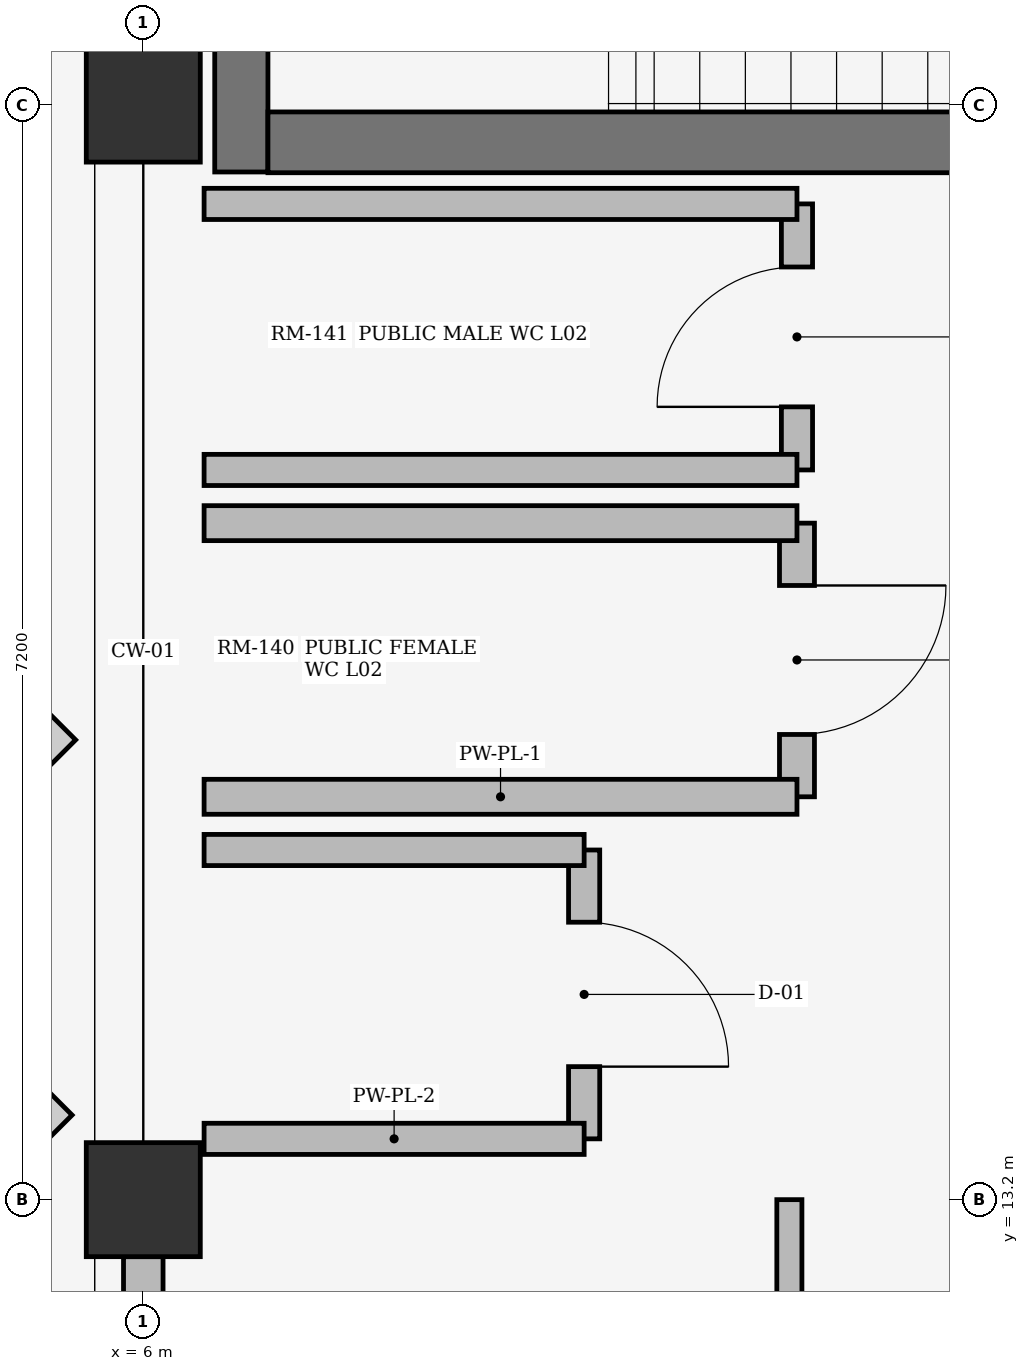
"""IFC4 building model, lengths in metres.
Left out: names, types, materials, properties, quantities, classifications, styles, units other than length and angle.
Written with IfcOpenShell. Run it as: python <this file> out.ifc"""

import sys

from ifc_helpers import new_model, si_unit, direction, frame, frame_2d, origin, origin_2d, place, context, subcontext, project, spatial, rectangle, extrude, element, fill, save


model = new_model("IFC4")
c1 = context("Model", 3, precision=1e-05, world=origin(), true_north=direction((0.0, 1.0)))
c2 = subcontext(c1, "Body", "Model", "MODEL_VIEW")
j1 = project(units=[si_unit("LENGTHUNIT", "METRE"), si_unit("PLANEANGLEUNIT", "RADIAN")], contexts=[c1])
p1 = place(None, origin())
s1 = spatial("IfcSite", under=j1, at=p1, CompositionType="ELEMENT")
p2 = place(p1, origin())
s2 = spatial("IfcBuilding", under=s1, at=p2, CompositionType="ELEMENT")
p3 = place(p2, frame((0.0, 0.0, 9.0)))
s3 = spatial("IfcBuildingStorey", under=s2, at=p3, CompositionType="ELEMENT", Elevation=9.0)
for number, where, z_axis, x_axis in (
    (1, (6.0, 13.2, 0.0), (0.0, 0.0, 1.0), (1.0, 0.0, 0.0)),
    (2, (6.0, 20.4, 0.0), (0.0, 0.0, 1.0), (1.0, 0.0, 0.0)),
):
    element("IfcColumn", number, at=place(p3, frame(where, z_axis=z_axis, x_axis=x_axis)), inside=s3, PredefinedType="COLUMN", context=c2, shape_type="SweptSolid", body=[
        extrude(rectangle(XDim=0.75, YDim=0.75, at=origin_2d()), origin(), (0.0, 0.0, 1.0), 3.96),
    ])
p4 = place(p3, frame((6.0, 6.375, 0.0), z_axis=(0.0, 0.0, 1.0), x_axis=(0.0, 1.0, 0.0)))
e3 = element("IfcWall", 3, at=p4, inside=s3, PredefinedType="STANDARD", context=c2, shape_type="SweptSolid", body=[
    extrude(rectangle(XDim=6.45, YDim=0.26, at=frame_2d((3.225, 0.0))), origin(), (0.0, 0.0, 1.0), 3.34),
])
p5 = place(p4, frame((2.675, 0.0, 0.75)))
e4 = element("IfcOpeningElement", 4, at=p5, cuts=e3, PredefinedType="OPENING", context=c2, shape_type="SweptSolid", body=[
    extrude(rectangle(XDim=1.1, YDim=1.25, at=frame_2d((0.55, 0.625))), frame((0.0, 0.14, 0.0), z_axis=(0.0, -1.0, 0.0), x_axis=(1.0, 0.0, 0.0)), (0.0, 0.0, 1.0), 0.28),
])
p6 = place(p3, frame((6.645, 24.55, 0.0), z_axis=(0.0, 0.0, 1.0), x_axis=(0.0, -1.0, 0.0)))
e5 = element("IfcWall", 5, at=p6, inside=s3, PredefinedType="SHEAR", context=c2, shape_type="SweptSolid", body=[
    extrude(rectangle(XDim=4.59, YDim=0.35, at=frame_2d((2.295, 0.0))), origin(), (0.0, 0.0, 1.0), 3.96),
])
p7 = place(p3, frame((14.8, 20.155, 0.0), z_axis=(0.0, 0.0, 1.0), x_axis=(-1.0, 0.0, 0.0)))
e6 = element("IfcWall", 6, at=p7, inside=s3, PredefinedType="SHEAR", context=c2, shape_type="SweptSolid", body=[
    extrude(rectangle(XDim=7.98, YDim=0.4, at=frame_2d((3.99, 0.0))), origin(), (0.0, 0.0, 1.0), 3.96),
])
p8 = place(p3, frame((8.9, 13.6, 0.0), z_axis=(0.0, 0.0, 1.0), x_axis=(0.0, 1.0, 0.0)))
e7 = element("IfcWall", 7, at=p8, inside=s3, PredefinedType="PLUMBINGWALL", context=c2, shape_type="SweptSolid", body=[
    extrude(rectangle(XDim=1.9, YDim=0.205, at=frame_2d((0.95, 0.0))), origin(), (0.0, 0.0, 1.0), 3.94),
])
p9 = place(p8, frame((0.475, 0.0, 0.0)))
e8 = element("IfcOpeningElement", 8, at=p9, cuts=e7, PredefinedType="OPENING", context=c2, shape_type="SweptSolid", body=[
    extrude(rectangle(XDim=0.95, YDim=2.15, at=frame_2d((0.475, 1.075))), frame((0.0, 0.113, 0.0), z_axis=(0.0, -1.0, 0.0), x_axis=(1.0, 0.0, 0.0)), (0.0, 0.0, 1.0), 0.225),
])
for number, where, z_axis, x_axis in (
    (9, (6.4, 13.6, 0.0), (0.0, 0.0, 1.0), (1.0, 0.0, 0.0)),
    (10, (6.4, 15.5, 0.0), (0.0, 0.0, 1.0), (1.0, 0.0, 0.0)),
):
    element("IfcWall", number, at=place(p3, frame(where, z_axis=z_axis, x_axis=x_axis)), inside=s3, PredefinedType="PLUMBINGWALL", context=c2, shape_type="SweptSolid", body=[
        extrude(rectangle(XDim=2.5, YDim=0.205, at=frame_2d((1.25, 0.0))), origin(), (0.0, 0.0, 1.0), 3.94),
    ])
p10 = place(p3, frame((10.3, 15.85, 0.0), z_axis=(0.0, 0.0, 1.0), x_axis=(0.0, 1.0, 0.0)))
e11 = element("IfcWall", 11, at=p10, inside=s3, PredefinedType="PLUMBINGWALL", context=c2, shape_type="SweptSolid", body=[
    extrude(rectangle(XDim=1.8, YDim=0.23, at=frame_2d((0.9, 0.0))), origin(), (0.0, 0.0, 1.0), 3.94),
])
p11 = place(p10, frame((0.41, 0.0, 0.0)))
e12 = element("IfcOpeningElement", 12, at=p11, cuts=e11, PredefinedType="OPENING", context=c2, shape_type="SweptSolid", body=[
    extrude(rectangle(XDim=0.98, YDim=2.1, at=frame_2d((0.49, 1.05))), frame((0.0, 0.125, 0.0), z_axis=(0.0, -1.0, 0.0), x_axis=(1.0, 0.0, 0.0)), (0.0, 0.0, 1.0), 0.25),
])
for number, where, z_axis, x_axis in (
    (13, (6.4, 15.85, 0.0), (0.0, 0.0, 1.0), (1.0, 0.0, 0.0)),
    (14, (6.4, 17.65, 0.0), (0.0, 0.0, 1.0), (1.0, 0.0, 0.0)),
):
    element("IfcWall", number, at=place(p3, frame(where, z_axis=z_axis, x_axis=x_axis)), inside=s3, PredefinedType="PLUMBINGWALL", context=c2, shape_type="SweptSolid", body=[
        extrude(rectangle(XDim=3.9, YDim=0.23, at=frame_2d((1.95, 0.0))), origin(), (0.0, 0.0, 1.0), 3.94),
    ])
p12 = place(p3, frame((10.3, 18.0, 0.0), z_axis=(0.0, 0.0, 1.0), x_axis=(0.0, 1.0, 0.0)))
e15 = element("IfcWall", 15, at=p12, inside=s3, PredefinedType="PLUMBINGWALL", context=c2, shape_type="SweptSolid", body=[
    extrude(rectangle(XDim=1.75, YDim=0.205, at=frame_2d((0.875, 0.0))), origin(), (0.0, 0.0, 1.0), 3.94),
])
p13 = place(p12, frame((0.415, 0.0, 0.0)))
e16 = element("IfcOpeningElement", 16, at=p13, cuts=e15, PredefinedType="OPENING", context=c2, shape_type="SweptSolid", body=[
    extrude(rectangle(XDim=0.92, YDim=2.1, at=frame_2d((0.46, 1.05))), frame((0.0, 0.113, 0.0), z_axis=(0.0, -1.0, 0.0), x_axis=(1.0, 0.0, 0.0)), (0.0, 0.0, 1.0), 0.225),
])
for number, where, z_axis, x_axis in (
    (17, (6.4, 18.0, 0.0), (0.0, 0.0, 1.0), (1.0, 0.0, 0.0)),
    (18, (6.4, 19.75, 0.0), (0.0, 0.0, 1.0), (1.0, 0.0, 0.0)),
):
    element("IfcWall", number, at=place(p3, frame(where, z_axis=z_axis, x_axis=x_axis)), inside=s3, PredefinedType="PLUMBINGWALL", context=c2, shape_type="SweptSolid", body=[
        extrude(rectangle(XDim=3.9, YDim=0.205, at=frame_2d((1.95, 0.0))), origin(), (0.0, 0.0, 1.0), 3.94),
    ])
p14 = place(p3, frame((10.25, 6.15, 0.0), z_axis=(0.0, 0.0, 1.0), x_axis=(0.0, 1.0, 0.0)))
e19 = element("IfcWall", 19, at=p14, inside=s3, PredefinedType="PARTITIONING", context=c2, shape_type="SweptSolid", body=[
    extrude(rectangle(XDim=7.05, YDim=0.165, at=frame_2d((3.525, 0.0))), origin(), (0.0, 0.0, 1.0), 3.94),
])
p15 = place(p14, frame((3.0, 0.0, 0.0)))
e20 = element("IfcOpeningElement", 20, at=p15, cuts=e19, PredefinedType="OPENING", context=c2, shape_type="SweptSolid", body=[
    extrude(rectangle(XDim=1.05, YDim=2.15, at=frame_2d((0.525, 1.075))), frame((0.0, 0.093, 0.0), z_axis=(0.0, -1.0, 0.0), x_axis=(1.0, 0.0, 0.0)), (0.0, 0.0, 1.0), 0.185),
])
p16 = place(p9, frame((0.95, 0.0, 0.0), z_axis=(0.0, 0.0, 1.0), x_axis=(-1.0, 0.0, 0.0)))
e21 = element("IfcDoor", 21, at=p16, inside=s3, OperationType="SINGLE_SWING_LEFT", PredefinedType="DOOR", context=c2, shape_type="SweptSolid", body=[
    extrude(rectangle(XDim=0.95, YDim=2.15, at=frame_2d((0.475, 1.075))), frame((0.0, 0.025, 0.0), z_axis=(0.0, -1.0, 0.0), x_axis=(1.0, 0.0, 0.0)), (0.0, 0.0, 1.0), 0.05),
])
fill(e8, e21)
p17 = place(p11, origin())
e22 = element("IfcDoor", 22, at=p17, inside=s3, OperationType="SINGLE_SWING_RIGHT", PredefinedType="DOOR", context=c2, shape_type="SweptSolid", body=[
    extrude(rectangle(XDim=0.98, YDim=2.1, at=frame_2d((0.49, 1.05))), frame((0.0, 0.025, 0.0), z_axis=(0.0, -1.0, 0.0), x_axis=(1.0, 0.0, 0.0)), (0.0, 0.0, 1.0), 0.05),
])
fill(e12, e22)
p18 = place(p13, origin())
e23 = element("IfcDoor", 23, at=p18, inside=s3, OperationType="SINGLE_SWING_LEFT", PredefinedType="DOOR", context=c2, shape_type="SweptSolid", body=[
    extrude(rectangle(XDim=0.92, YDim=2.1, at=frame_2d((0.46, 1.05))), frame((0.0, 0.025, 0.0), z_axis=(0.0, -1.0, 0.0), x_axis=(1.0, 0.0, 0.0)), (0.0, 0.0, 1.0), 0.05),
])
fill(e16, e23)
save(model, sys.argv[1])
